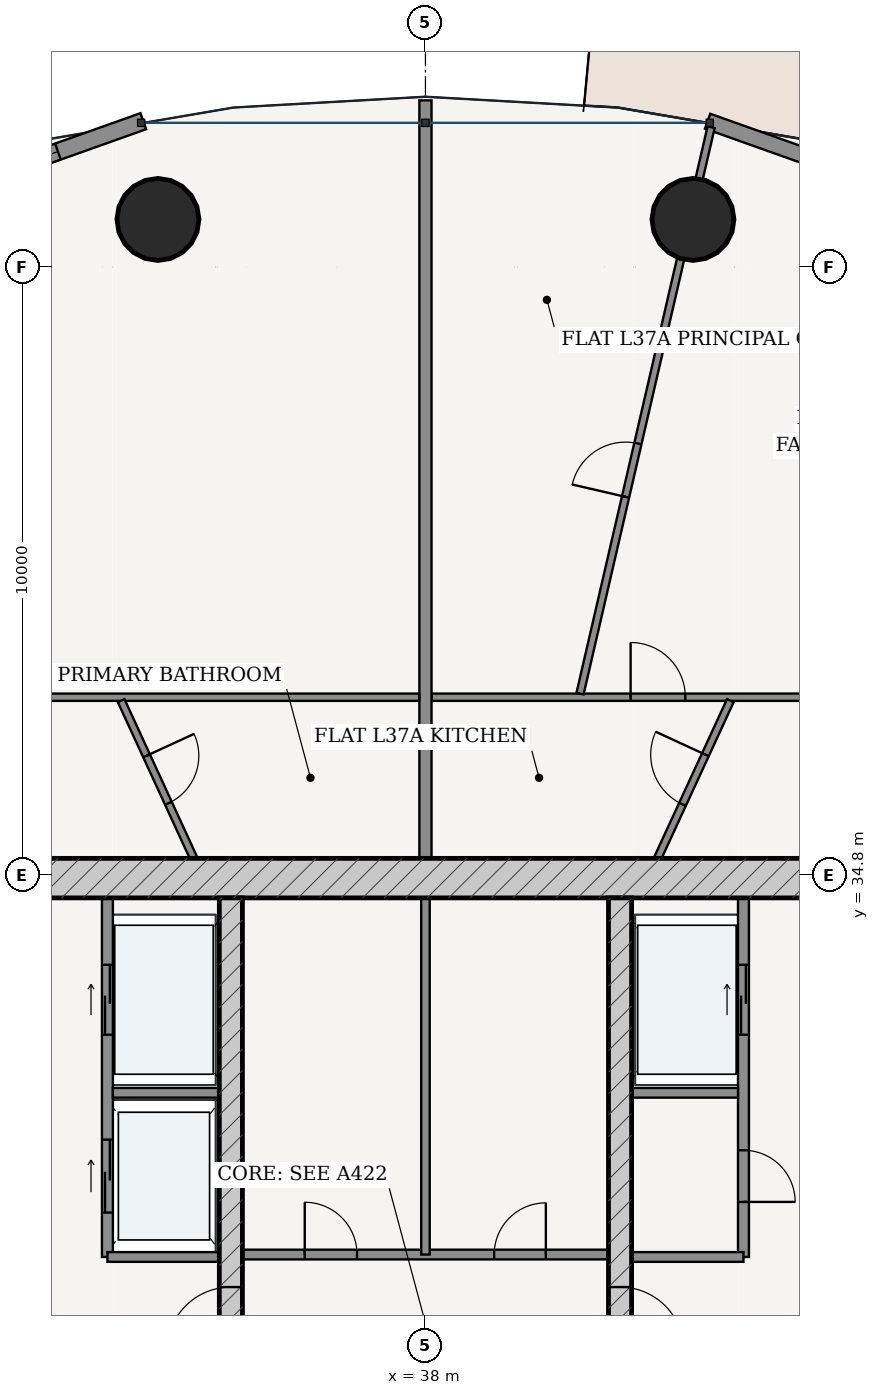
"""IFC4 building model, lengths in metres.
Left out: names, types, materials, properties, quantities, classifications, styles, units other than length and angle.
Written with IfcOpenShell. Run it as: python <this file> out.ifc"""

import sys

from ifc_helpers import new_model, si_unit, direction, frame, frame_2d, origin, origin_2d, place, context, subcontext, project, spatial, rectangle, hollow_circle, extrude, source, transform, mapped, element, fill, save


model = new_model("IFC4")
c1 = context("Model", 3, precision=1e-05, world=origin(), true_north=direction((-0.2419218956, 0.970295726276)))
c2 = subcontext(c1, "Body", "Model", "MODEL_VIEW")
j1 = project(units=[si_unit("LENGTHUNIT", "METRE"), si_unit("PLANEANGLEUNIT", "RADIAN")], contexts=[c1])
p1 = place(None, origin())
s1 = spatial("IfcSite", under=j1, at=p1, CompositionType="ELEMENT")
p2 = place(p1, origin())
s2 = spatial("IfcBuilding", under=s1, at=p2, CompositionType="ELEMENT")
p3 = place(p2, frame((0.0, 0.0, 142.6)))
s3 = spatial("IfcBuildingStorey", under=s2, at=p3, CompositionType="ELEMENT", Elevation=142.6)
p4 = place(p3, frame((28.725, 34.75, 0.0), z_axis=(0.0, 0.0, 1.0), x_axis=(1.0, 0.0, 0.0)))
e1 = element("IfcWall", 1, at=p4, inside=s3, PredefinedType="SHEAR", context=c2, shape_type="SweptSolid", body=[
    extrude(rectangle(XDim=18.55, YDim=0.65, at=frame_2d((9.275, 0.0))), origin(), (0.0, 0.0, 1.0), 3.33),
])
p5 = place(p3, frame((34.8, 19.175, 0.0), z_axis=(0.0, 0.0, 1.0), x_axis=(0.0, 1.0, 0.0)))
e2 = element("IfcWall", 2, at=p5, inside=s3, PredefinedType="SHEAR", context=c2, shape_type="SweptSolid", body=[
    extrude(rectangle(XDim=15.25, YDim=0.38, at=frame_2d((7.625, 0.0))), origin(), (0.0, 0.0, 1.0), 3.33),
])
p6 = place(p5, frame((7.8, 0.0, 0.0)))
e3 = element("IfcOpeningElement", 3, at=p6, cuts=e2, PredefinedType="OPENING", context=c2, shape_type="SweptSolid", body=[
    extrude(rectangle(XDim=1.05, YDim=2.15, at=frame_2d((0.525, 1.075))), frame((0.0, 0.2, 0.0), z_axis=(0.0, -1.0, 0.0), x_axis=(1.0, 0.0, 0.0)), (0.0, 0.0, 1.0), 0.4),
])
p7 = place(p3, frame((41.2, 19.175, 0.0), z_axis=(0.0, 0.0, 1.0), x_axis=(0.0, 1.0, 0.0)))
e4 = element("IfcWall", 4, at=p7, inside=s3, PredefinedType="SHEAR", context=c2, shape_type="SweptSolid", body=[
    extrude(rectangle(XDim=15.25, YDim=0.38, at=frame_2d((7.625, 0.0))), origin(), (0.0, 0.0, 1.0), 3.33),
])
p8 = place(p7, frame((7.8, 0.0, 0.0)))
e5 = element("IfcOpeningElement", 5, at=p8, cuts=e4, PredefinedType="OPENING", context=c2, shape_type="SweptSolid", body=[
    extrude(rectangle(XDim=1.05, YDim=2.15, at=frame_2d((0.525, 1.075))), frame((0.0, 0.2, 0.0), z_axis=(0.0, -1.0, 0.0), x_axis=(1.0, 0.0, 0.0)), (0.0, 0.0, 1.0), 0.4),
])
for number, where, z_axis, x_axis in (
    (6, (42.399, 45.582, 0.0), (0.0, 0.0, 1.0), (1.0, 0.0, 0.0)),
    (7, (33.601, 45.582, 0.0), (0.0, 0.0, 1.0), (1.0, 0.0, 0.0)),
):
    element("IfcColumn", number, at=place(p3, frame(where, z_axis=z_axis, x_axis=x_axis)), inside=s3, PredefinedType="COLUMN", context=c2, shape_type="SweptSolid", body=[
        extrude(hollow_circle(Radius=0.675, WallThickness=0.042, at=origin_2d()), origin(), (0.0, 0.0, 1.0), 3.6),
    ])
p9 = place(p3, frame((51.503, 44.043, 0.0), z_axis=(0.0, 0.0, 1.0), x_axis=(-0.942095406405, 0.335344964522, 0.0)))
e8 = element("IfcWall", 8, at=p9, inside=s3, PredefinedType="SOLIDWALL", context=c2, shape_type="SweptSolid", body=[
    extrude(rectangle(XDim=9.408, YDim=0.26, at=frame_2d((4.704, 0.0))), origin(), (0.0, 0.0, 1.0), 3.33),
])
p10 = place(p9, frame((4.029, 0.0, 0.0)))
e9 = element("IfcOpeningElement", 9, at=p10, cuts=e8, PredefinedType="OPENING", context=c2, shape_type="SweptSolid", body=[
    extrude(rectangle(XDim=1.35, YDim=2.2, at=frame_2d((0.675, 1.1))), frame((0.0, 0.14, 0.0), z_axis=(0.0, -1.0, 0.0), x_axis=(1.0, 0.0, 0.0)), (0.0, 0.0, 1.0), 0.28),
])
p11 = place(p3, frame((33.36, 47.198, 0.0), z_axis=(0.0, 0.0, 1.0), x_axis=(-0.942095406405, -0.335344964522, 0.0)))
e10 = element("IfcWall", 10, at=p11, inside=s3, PredefinedType="SOLIDWALL", context=c2, shape_type="SweptSolid", body=[
    extrude(rectangle(XDim=9.408, YDim=0.28, at=frame_2d((4.704, 0.0))), origin(), (0.0, 0.0, 1.0), 3.33),
])
p12 = place(p11, frame((1.49, 0.0, 0.85)))
e11 = element("IfcOpeningElement", 11, at=p12, cuts=e10, PredefinedType="OPENING", context=c2, shape_type="SweptSolid", body=[
    extrude(rectangle(XDim=2.1, YDim=1.95, at=frame_2d((1.05, 0.975))), frame((0.0, 0.15, 0.0), z_axis=(0.0, -1.0, 0.0), x_axis=(1.0, 0.0, 0.0)), (0.0, 0.0, 1.0), 0.3),
])
p13 = place(p11, frame((5.818, 0.0, 0.85)))
e12 = element("IfcOpeningElement", 12, at=p13, cuts=e10, PredefinedType="OPENING", context=c2, shape_type="SweptSolid", body=[
    extrude(rectangle(XDim=2.1, YDim=1.95, at=frame_2d((1.05, 0.975))), frame((0.0, 0.15, 0.0), z_axis=(0.0, -1.0, 0.0), x_axis=(1.0, 0.0, 0.0)), (0.0, 0.0, 1.0), 0.3),
])
p14 = place(p3, frame((32.77, 28.52, 0.0), z_axis=(0.0, 0.0, 1.0), x_axis=(0.0, 1.0, 0.0)))
e13 = element("IfcWall", 13, at=p14, inside=s3, PredefinedType="PARTITIONING", context=c2, shape_type="SweptSolid", body=[
    extrude(rectangle(XDim=5.905, YDim=0.18, at=frame_2d((2.953, 0.0))), origin(), (0.0, 0.0, 1.0), 3.33),
])
p15 = place(p14, frame((3.655, 0.0, 0.0)))
e14 = element("IfcOpeningElement", 14, at=p15, cuts=e13, PredefinedType="OPENING", context=c2, shape_type="SweptSolid", body=[
    extrude(rectangle(XDim=1.15, YDim=2.2, at=frame_2d((0.575, 1.1))), frame((0.0, 0.1, 0.0), z_axis=(0.0, -1.0, 0.0), x_axis=(1.0, 0.0, 0.0)), (0.0, 0.0, 1.0), 0.2),
])
p16 = place(p14, frame((0.73, 0.0, 0.0)))
e15 = element("IfcOpeningElement", 15, at=p16, cuts=e13, PredefinedType="OPENING", context=c2, shape_type="SweptSolid", body=[
    extrude(rectangle(XDim=1.2, YDim=2.25, at=frame_2d((0.6, 1.125))), frame((0.0, 0.1, 0.0), z_axis=(0.0, -1.0, 0.0), x_axis=(1.0, 0.0, 0.0)), (0.0, 0.0, 1.0), 0.2),
])
p17 = place(p3, frame((32.86, 31.22, 0.0), z_axis=(0.0, 0.0, 1.0), x_axis=(1.0, 0.0, 0.0)))
e16 = element("IfcWall", 16, at=p17, inside=s3, PredefinedType="PARTITIONING", context=c2, shape_type="SweptSolid", body=[
    extrude(rectangle(XDim=1.75, YDim=0.16, at=frame_2d((0.875, 0.0))), origin(), (0.0, 0.0, 1.0), 3.33),
])
p18 = place(p3, frame((32.77, 28.52, 0.0), z_axis=(0.0, 0.0, 1.0), x_axis=(1.0, 0.0, 0.0)))
e17 = element("IfcWall", 17, at=p18, inside=s3, PredefinedType="PARTITIONING", context=c2, shape_type="SweptSolid", body=[
    extrude(rectangle(XDim=1.84, YDim=0.16, at=frame_2d((0.92, 0.0))), origin(), (0.0, 0.0, 1.0), 3.33),
])
p19 = place(p3, frame((43.23, 28.52, 0.0), z_axis=(0.0, 0.0, 1.0), x_axis=(0.0, 1.0, 0.0)))
e18 = element("IfcWall", 18, at=p19, inside=s3, PredefinedType="PARTITIONING", context=c2, shape_type="SweptSolid", body=[
    extrude(rectangle(XDim=5.905, YDim=0.18, at=frame_2d((2.953, 0.0))), origin(), (0.0, 0.0, 1.0), 3.33),
])
p20 = place(p19, frame((0.905, 0.0, 0.0)))
e19 = element("IfcOpeningElement", 19, at=p20, cuts=e18, PredefinedType="OPENING", context=c2, shape_type="SweptSolid", body=[
    extrude(rectangle(XDim=0.85, YDim=2.1, at=frame_2d((0.425, 1.05))), frame((0.0, 0.1, 0.0), z_axis=(0.0, -1.0, 0.0), x_axis=(1.0, 0.0, 0.0)), (0.0, 0.0, 1.0), 0.2),
])
p21 = place(p19, frame((3.655, 0.0, 0.0)))
e20 = element("IfcOpeningElement", 20, at=p21, cuts=e18, PredefinedType="OPENING", context=c2, shape_type="SweptSolid", body=[
    extrude(rectangle(XDim=1.15, YDim=2.2, at=frame_2d((0.575, 1.1))), frame((0.0, 0.1, 0.0), z_axis=(0.0, -1.0, 0.0), x_axis=(1.0, 0.0, 0.0)), (0.0, 0.0, 1.0), 0.2),
])
p22 = place(p3, frame((41.39, 31.22, 0.0), z_axis=(0.0, 0.0, 1.0), x_axis=(1.0, 0.0, 0.0)))
e21 = element("IfcWall", 21, at=p22, inside=s3, PredefinedType="PARTITIONING", context=c2, shape_type="SweptSolid", body=[
    extrude(rectangle(XDim=1.75, YDim=0.16, at=frame_2d((0.875, 0.0))), origin(), (0.0, 0.0, 1.0), 3.33),
])
p23 = place(p3, frame((41.39, 28.52, 0.0), z_axis=(0.0, 0.0, 1.0), x_axis=(1.0, 0.0, 0.0)))
e22 = element("IfcWall", 22, at=p23, inside=s3, PredefinedType="PARTITIONING", context=c2, shape_type="SweptSolid", body=[
    extrude(rectangle(XDim=1.84, YDim=0.16, at=frame_2d((0.92, 0.0))), origin(), (0.0, 0.0, 1.0), 3.33),
])
p24 = place(p3, frame((34.99, 28.56, 0.0), z_axis=(0.0, 0.0, 1.0), x_axis=(1.0, 0.0, 0.0)))
e23 = element("IfcWall", 23, at=p24, inside=s3, PredefinedType="PARTITIONING", context=c2, shape_type="SweptSolid", body=[
    extrude(rectangle(XDim=6.02, YDim=0.16, at=frame_2d((3.01, 0.0))), origin(), (0.0, 0.0, 1.0), 3.33),
])
p25 = place(p24, frame((1.025, 0.0, 0.0)))
e24 = element("IfcOpeningElement", 24, at=p25, cuts=e23, PredefinedType="OPENING", context=c2, shape_type="SweptSolid", body=[
    extrude(rectangle(XDim=0.86, YDim=2.1, at=frame_2d((0.43, 1.05))), frame((0.0, 0.09, 0.0), z_axis=(0.0, -1.0, 0.0), x_axis=(1.0, 0.0, 0.0)), (0.0, 0.0, 1.0), 0.18),
])
p26 = place(p24, frame((4.14, 0.0, 0.0)))
e25 = element("IfcOpeningElement", 25, at=p26, cuts=e23, PredefinedType="OPENING", context=c2, shape_type="SweptSolid", body=[
    extrude(rectangle(XDim=0.85, YDim=2.1, at=frame_2d((0.425, 1.05))), frame((0.0, 0.09, 0.0), z_axis=(0.0, -1.0, 0.0), x_axis=(1.0, 0.0, 0.0)), (0.0, 0.0, 1.0), 0.18),
])
p27 = place(p3, frame((38.0, 28.56, 0.0), z_axis=(0.0, 0.0, 1.0), x_axis=(0.0, 1.0, 0.0)))
e26 = element("IfcWall", 26, at=p27, inside=s3, PredefinedType="PARTITIONING", context=c2, shape_type="SweptSolid", body=[
    extrude(rectangle(XDim=5.865, YDim=0.14, at=frame_2d((2.933, 0.0))), origin(), (0.0, 0.0, 1.0), 3.33),
])
p28 = place(p3, frame((38.102, 37.725, 0.0), z_axis=(0.0, 0.0, 1.0), x_axis=(1.0, 0.0, 0.0)))
e27 = element("IfcWall", 27, at=p28, inside=s3, PredefinedType="PARTITIONING", context=c2, shape_type="SweptSolid", body=[
    extrude(rectangle(XDim=6.363, YDim=0.12, at=frame_2d((3.182, 0.0))), origin(), (0.0, 0.0, 1.0), 2.776),
])
p29 = place(p28, frame((3.272, 0.0, 0.0)))
e28 = element("IfcOpeningElement", 28, at=p29, cuts=e27, PredefinedType="OPENING", context=c2, shape_type="SweptSolid", body=[
    extrude(rectangle(XDim=0.9, YDim=2.15, at=frame_2d((0.45, 1.075))), frame((0.0, 0.07, 0.0), z_axis=(0.0, -1.0, 0.0), x_axis=(1.0, 0.0, 0.0)), (0.0, 0.0, 1.0), 0.14),
])
p30 = place(p3, frame((40.542, 37.785, 0.0), z_axis=(0.0, 0.0, 1.0), x_axis=(0.225467545633, 0.974250679171, 0.0)))
e29 = element("IfcWall", 29, at=p30, inside=s3, PredefinedType="PARTITIONING", context=c2, shape_type="SweptSolid", body=[
    extrude(rectangle(XDim=9.559, YDim=0.12, at=frame_2d((4.78, 0.0))), origin(), (0.0, 0.0, 1.0), 2.776),
])
p31 = place(p30, frame((3.32, 0.0, 0.0)))
e30 = element("IfcOpeningElement", 30, at=p31, cuts=e29, PredefinedType="OPENING", context=c2, shape_type="SweptSolid", body=[
    extrude(rectangle(XDim=0.9, YDim=2.15, at=frame_2d((0.45, 1.075))), frame((0.0, 0.07, 0.0), z_axis=(0.0, -1.0, 0.0), x_axis=(1.0, 0.0, 0.0)), (0.0, 0.0, 1.0), 0.14),
])
p32 = place(p3, frame((41.817, 35.075, 0.0), z_axis=(0.0, 0.0, 1.0), x_axis=(0.418890148101, 0.908036917655, 0.0)))
e31 = element("IfcWall", 31, at=p32, inside=s3, PredefinedType="PARTITIONING", context=c2, shape_type="SweptSolid", body=[
    extrude(rectangle(XDim=2.856, YDim=0.12, at=frame_2d((1.428, 0.0))), origin(), (0.0, 0.0, 1.0), 3.33),
])
p33 = place(p32, frame((0.978, 0.0, 0.0)))
e32 = element("IfcOpeningElement", 32, at=p33, cuts=e31, PredefinedType="OPENING", context=c2, shape_type="SweptSolid", body=[
    extrude(rectangle(XDim=0.9, YDim=2.15, at=frame_2d((0.45, 1.075))), frame((0.0, 0.07, 0.0), z_axis=(0.0, -1.0, 0.0), x_axis=(1.0, 0.0, 0.0)), (0.0, 0.0, 1.0), 0.14),
])
p34 = place(p3, frame((38.0, 35.075, 0.0), z_axis=(0.0, 0.0, 1.0), x_axis=(0.0, 1.0, 0.0)))
e33 = element("IfcWall", 33, at=p34, inside=s3, PredefinedType="PARTITIONING", context=c2, shape_type="SweptSolid", body=[
    extrude(rectangle(XDim=12.465, YDim=0.2, at=frame_2d((6.232, 0.0))), origin(), (0.0, 0.0, 1.0), 2.415),
])
p35 = place(p3, frame((31.535, 37.725, 0.0), z_axis=(0.0, 0.0, 1.0), x_axis=(1.0, 0.0, 0.0)))
e34 = element("IfcWall", 34, at=p35, inside=s3, PredefinedType="PARTITIONING", context=c2, shape_type="SweptSolid", body=[
    extrude(rectangle(XDim=6.363, YDim=0.12, at=frame_2d((3.182, 0.0))), origin(), (0.0, 0.0, 1.0), 2.776),
])
p36 = place(p3, frame((34.19, 35.075, 0.0), z_axis=(0.0, 0.0, 1.0), x_axis=(-0.418255585009, 0.908329381672, 0.0)))
e35 = element("IfcWall", 35, at=p36, inside=s3, PredefinedType="PARTITIONING", context=c2, shape_type="SweptSolid", body=[
    extrude(rectangle(XDim=2.855, YDim=0.12, at=frame_2d((1.428, 0.0))), origin(), (0.0, 0.0, 1.0), 3.33),
])
p37 = place(p36, frame((0.998, 0.0, 0.0)))
e36 = element("IfcOpeningElement", 36, at=p37, cuts=e35, PredefinedType="OPENING", context=c2, shape_type="SweptSolid", body=[
    extrude(rectangle(XDim=0.86, YDim=2.15, at=frame_2d((0.43, 1.075))), frame((0.0, 0.07, 0.0), z_axis=(0.0, -1.0, 0.0), x_axis=(1.0, 0.0, 0.0)), (0.0, 0.0, 1.0), 0.14),
])
m1 = source(origin(), c2, "Body", "SweptSolid", [
    extrude(rectangle(XDim=2.1, YDim=1.95, at=frame_2d((1.05, 0.975))), frame((0.0, 0.03, 0.0), z_axis=(0.0, -1.0, 0.0), x_axis=(1.0, 0.0, 0.0)), (0.0, 0.0, 1.0), 0.06),
])
p38 = place(p12, origin())
e37 = element("IfcWindow", 37, at=p38, inside=s3, PartitioningType="SINGLE_PANEL", PredefinedType="WINDOW", context=c2, shape_type="MappedRepresentation", body=[
    mapped(m1, transform((0.0, 0.0, 0.0), scale=1.0)),
])
fill(e11, e37)
m2 = source(origin(), c2, "Body", "SweptSolid", [
    extrude(rectangle(XDim=1.05, YDim=2.15, at=frame_2d((0.525, 1.075))), frame((0.0, 0.025, 0.0), z_axis=(0.0, -1.0, 0.0), x_axis=(1.0, 0.0, 0.0)), (0.0, 0.0, 1.0), 0.05),
])
p39 = place(p6, origin())
e38 = element("IfcDoor", 38, at=p39, inside=s3, OperationType="SINGLE_SWING_LEFT", PredefinedType="DOOR", context=c2, shape_type="MappedRepresentation", body=[
    mapped(m2, transform((0.0, 0.0, 0.0), scale=1.0)),
])
fill(e3, e38)
p40 = place(p8, frame((1.05, 0.0, 0.0), z_axis=(0.0, 0.0, 1.0), x_axis=(-1.0, 0.0, 0.0)))
e39 = element("IfcDoor", 39, at=p40, inside=s3, OperationType="SINGLE_SWING_RIGHT", PredefinedType="DOOR", context=c2, shape_type="MappedRepresentation", body=[
    mapped(m2, transform((0.0, 0.0, 0.0), scale=1.0)),
])
fill(e5, e39)
m3 = source(origin(), c2, "Body", "SweptSolid", [
    extrude(rectangle(XDim=0.85, YDim=2.1, at=frame_2d((0.425, 1.05))), frame((0.0, 0.025, 0.0), z_axis=(0.0, -1.0, 0.0), x_axis=(1.0, 0.0, 0.0)), (0.0, 0.0, 1.0), 0.05),
])
p41 = place(p20, frame((0.85, 0.0, 0.0), z_axis=(0.0, 0.0, 1.0), x_axis=(-1.0, 0.0, 0.0)))
e40 = element("IfcDoor", 40, at=p41, inside=s3, OperationType="SINGLE_SWING_RIGHT", PredefinedType="DOOR", context=c2, shape_type="MappedRepresentation", body=[
    mapped(m3, transform((0.0, 0.0, 0.0), scale=1.0)),
])
fill(e19, e40)
m4 = source(origin(), c2, "Body", "SweptSolid", [
    extrude(rectangle(XDim=0.86, YDim=2.1, at=frame_2d((0.43, 1.05))), frame((0.0, 0.025, 0.0), z_axis=(0.0, -1.0, 0.0), x_axis=(1.0, 0.0, 0.0)), (0.0, 0.0, 1.0), 0.05),
])
p42 = place(p25, origin())
e41 = element("IfcDoor", 41, at=p42, inside=s3, OperationType="SINGLE_SWING_LEFT", PredefinedType="DOOR", context=c2, shape_type="MappedRepresentation", body=[
    mapped(m4, transform((0.0, 0.0, 0.0), scale=1.0)),
])
fill(e24, e41)
p43 = place(p26, origin())
e42 = element("IfcDoor", 42, at=p43, inside=s3, OperationType="SINGLE_SWING_RIGHT", PredefinedType="DOOR", context=c2, shape_type="MappedRepresentation", body=[
    mapped(m3, transform((0.0, 0.0, 0.0), scale=1.0)),
])
fill(e25, e42)
m5 = source(origin(), c2, "Body", "SweptSolid", [
    extrude(rectangle(XDim=1.15, YDim=2.2, at=frame_2d((0.575, 1.1))), frame((0.0, 0.025, 0.0), z_axis=(0.0, -1.0, 0.0), x_axis=(1.0, 0.0, 0.0)), (0.0, 0.0, 1.0), 0.05),
])
p44 = place(p15, origin())
e43 = element("IfcDoor", 43, at=p44, inside=s3, OperationType="DOUBLE_DOOR_SLIDING", PredefinedType="DOOR", context=c2, shape_type="MappedRepresentation", body=[
    mapped(m5, transform((0.0, 0.0, 0.0), scale=1.0)),
])
fill(e14, e43)
p45 = place(p21, origin())
e44 = element("IfcDoor", 44, at=p45, inside=s3, OperationType="DOUBLE_DOOR_SLIDING", PredefinedType="DOOR", context=c2, shape_type="MappedRepresentation", body=[
    mapped(m5, transform((0.0, 0.0, 0.0), scale=1.0)),
])
fill(e20, e44)
m6 = source(origin(), c2, "Body", "SweptSolid", [
    extrude(rectangle(XDim=1.2, YDim=2.25, at=frame_2d((0.6, 1.125))), frame((0.0, 0.025, 0.0), z_axis=(0.0, -1.0, 0.0), x_axis=(1.0, 0.0, 0.0)), (0.0, 0.0, 1.0), 0.05),
])
p46 = place(p16, origin())
e45 = element("IfcDoor", 45, at=p46, inside=s3, OperationType="DOUBLE_DOOR_SLIDING", PredefinedType="DOOR", context=c2, shape_type="MappedRepresentation", body=[
    mapped(m6, transform((0.0, 0.0, 0.0), scale=1.0)),
])
fill(e15, e45)
m7 = source(origin(), c2, "Body", "SweptSolid", [
    extrude(rectangle(XDim=0.9, YDim=2.15, at=frame_2d((0.45, 1.075))), frame((0.0, 0.025, 0.0), z_axis=(0.0, -1.0, 0.0), x_axis=(1.0, 0.0, 0.0)), (0.0, 0.0, 1.0), 0.05),
])
p47 = place(p33, origin())
e46 = element("IfcDoor", 46, at=p47, inside=s3, OperationType="SINGLE_SWING_RIGHT", PredefinedType="DOOR", context=c2, shape_type="MappedRepresentation", body=[
    mapped(m7, transform((0.0, 0.0, 0.0), scale=1.0)),
])
fill(e32, e46)
p48 = place(p29, origin())
e47 = element("IfcDoor", 47, at=p48, inside=s3, OperationType="SINGLE_SWING_LEFT", PredefinedType="DOOR", context=c2, shape_type="MappedRepresentation", body=[
    mapped(m7, transform((0.0, 0.0, 0.0), scale=1.0)),
])
fill(e28, e47)
p49 = place(p31, origin())
e48 = element("IfcDoor", 48, at=p49, inside=s3, OperationType="SINGLE_SWING_LEFT", PredefinedType="DOOR", context=c2, shape_type="MappedRepresentation", body=[
    mapped(m7, transform((0.0, 0.0, 0.0), scale=1.0)),
])
fill(e30, e48)
m8 = source(origin(), c2, "Body", "SweptSolid", [
    extrude(rectangle(XDim=0.86, YDim=2.15, at=frame_2d((0.43, 1.075))), frame((0.0, 0.025, 0.0), z_axis=(0.0, -1.0, 0.0), x_axis=(1.0, 0.0, 0.0)), (0.0, 0.0, 1.0), 0.05),
])
p50 = place(p37, frame((0.86, 0.0, 0.0), z_axis=(0.0, 0.0, 1.0), x_axis=(-1.0, 0.0, 0.0)))
e49 = element("IfcDoor", 49, at=p50, inside=s3, OperationType="SINGLE_SWING_LEFT", PredefinedType="DOOR", context=c2, shape_type="MappedRepresentation", body=[
    mapped(m8, transform((0.0, 0.0, 0.0), scale=1.0)),
])
fill(e36, e49)
save(model, sys.argv[1])
